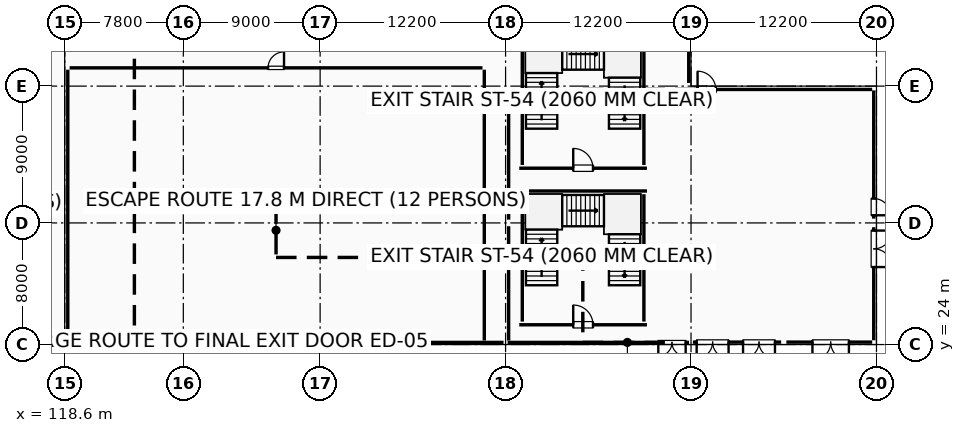
"""IFC4 building model, lengths in metres.
Left out: names, types, materials, properties, quantities, classifications, styles, units other than length and angle.
Written with IfcOpenShell. Run it as: python <this file> out.ifc"""

import sys

from ifc_helpers import new_model, si_unit, direction, frame, frame_2d, origin, origin_2d, place, context, subcontext, project, spatial, rectangle, i_section, extrude, element, fill, save


model = new_model("IFC4")
c1 = context("Model", 3, precision=1e-05, world=origin(), true_north=direction((0.0, 1.0)))
c2 = subcontext(c1, "Body", "Model", "MODEL_VIEW")
j1 = project(units=[si_unit("LENGTHUNIT", "METRE"), si_unit("PLANEANGLEUNIT", "RADIAN")], contexts=[c1])
p1 = place(None, origin())
s1 = spatial("IfcSite", under=j1, at=p1, CompositionType="ELEMENT")
p2 = place(p1, origin())
s2 = spatial("IfcBuilding", under=s1, at=p2, CompositionType="ELEMENT")
p3 = place(p2, origin())
s3 = spatial("IfcBuildingStorey", under=s2, at=p3, CompositionType="ELEMENT", Elevation=0.0)
for number, where, z_axis, x_axis in (
    (1, (126.4, 24.0, 0.0), (0.0, 0.0, 1.0), (1.0, 0.0, 0.0)),
    (2, (126.4, 32.0, 0.0), (0.0, 0.0, 1.0), (1.0, 0.0, 0.0)),
    (3, (126.4, 41.0, 0.0), (0.0, 0.0, 1.0), (1.0, 0.0, 0.0)),
    (4, (135.4, 24.0, 0.0), (0.0, 0.0, 1.0), (1.0, 0.0, 0.0)),
    (5, (135.4, 41.0, 0.0), (0.0, 0.0, 1.0), (1.0, 0.0, 0.0)),
):
    element("IfcColumn", number, at=place(p3, frame(where, z_axis=z_axis, x_axis=x_axis)), inside=s3, PredefinedType="COLUMN", context=c2, shape_type="SweptSolid", body=[
        extrude(rectangle(XDim=0.75, YDim=0.75, at=origin_2d()), origin(), (0.0, 0.0, 1.0), 5.4),
    ])
for number, where, z_axis, x_axis in (
    (6, (147.6, 24.0, 0.0), (0.0, 0.0, 1.0), (1.0, 0.0, 0.0)),
    (7, (147.6, 32.0, 0.0), (0.0, 0.0, 1.0), (1.0, 0.0, 0.0)),
    (8, (147.6, 41.0, 0.0), (0.0, 0.0, 1.0), (1.0, 0.0, 0.0)),
    (9, (159.8, 24.0, 0.0), (0.0, 0.0, 1.0), (1.0, 0.0, 0.0)),
    (10, (159.8, 32.0, 0.0), (0.0, 0.0, 1.0), (1.0, 0.0, 0.0)),
    (11, (159.8, 41.0, 0.0), (0.0, 0.0, 1.0), (1.0, 0.0, 0.0)),
):
    element("IfcColumn", number, at=place(p3, frame(where, z_axis=z_axis, x_axis=x_axis)), inside=s3, PredefinedType="COLUMN", context=c2, shape_type="SweptSolid", body=[
        extrude(i_section(OverallWidth=0.25, OverallDepth=0.4, WebThickness=0.01, FlangeThickness=0.013, FilletRadius=0.014, at=origin_2d()), origin(), (0.0, 0.0, 1.0), 5.4),
    ])
for number, where, z_axis, x_axis in (
    (12, (172.0, 24.0, 0.0), (0.0, 0.0, 1.0), (1.0, 0.0, 0.0)),
    (13, (172.0, 32.0, 0.0), (0.0, 0.0, 1.0), (1.0, 0.0, 0.0)),
    (14, (172.0, 41.0, 0.0), (0.0, 0.0, 1.0), (1.0, 0.0, 0.0)),
):
    element("IfcColumn", number, at=place(p3, frame(where, z_axis=z_axis, x_axis=x_axis)), inside=s3, PredefinedType="COLUMN", context=c2, shape_type="SweptSolid", body=[
        extrude(rectangle(XDim=0.55, YDim=0.55, at=origin_2d()), origin(), (0.0, 0.0, 1.0), 5.36),
    ])
for number, where, z_axis, x_axis in (
    (15, (151.22, 31.08, 0.0), (0.0, 0.0, 1.0), (1.0, 0.0, 0.0)),
    (16, (154.18, 31.08, 0.0), (0.0, 0.0, 1.0), (1.0, 0.0, 0.0)),
    (17, (151.22, 41.38, 0.0), (0.0, 0.0, 1.0), (1.0, 0.0, 0.0)),
    (18, (154.18, 41.38, 0.0), (0.0, 0.0, 1.0), (1.0, 0.0, 0.0)),
):
    element("IfcColumn", number, at=place(p3, frame(where, z_axis=z_axis, x_axis=x_axis)), inside=s3, PredefinedType="COLUMN", context=c2, shape_type="SweptSolid", body=[
        extrude(i_section(OverallWidth=0.25, OverallDepth=0.35, WebThickness=0.01, FlangeThickness=0.012, FilletRadius=0.012, at=origin_2d()), origin(), (0.0, 0.0, 1.0), 5.4),
    ])
p4 = place(p3, frame((165.9, 24.0, 0.0), z_axis=(0.0, 0.0, 1.0), x_axis=(1.0, 0.0, 0.0)))
e19 = element("IfcColumn", 19, at=p4, inside=s3, PredefinedType="PILASTER", context=c2, shape_type="SweptSolid", body=[
    extrude(rectangle(XDim=0.35, YDim=0.6, at=origin_2d()), origin(), (0.0, 0.0, 1.0), 5.4),
])
p5 = place(p3, frame((159.65, 49.792, 0.0), z_axis=(0.0, 0.0, 1.0), x_axis=(0.0, -1.0, 0.0)))
e20 = element("IfcWall", 20, at=p5, inside=s3, PredefinedType="ELEMENTEDWALL", context=c2, shape_type="SweptSolid", body=[
    extrude(rectangle(XDim=8.584, YDim=0.26, at=frame_2d((4.292, 0.0))), origin(), (0.0, 0.0, 1.0), 4.655),
])
p6 = place(p5, frame((0.22, 0.0, 0.0)))
e21 = element("IfcOpeningElement", 21, at=p6, cuts=e20, PredefinedType="OPENING", context=c2, shape_type="SweptSolid", body=[
    extrude(rectangle(XDim=1.8, YDim=2.25, at=frame_2d((0.9, 1.125))), frame((0.0, 0.14, 0.0), z_axis=(0.0, -1.0, 0.0), x_axis=(1.0, 0.0, 0.0)), (0.0, 0.0, 1.0), 0.28),
])
p7 = place(p3, frame((160.01, 40.78, 0.0), z_axis=(0.0, 0.0, 1.0), x_axis=(1.0, 0.0, 0.0)))
e22 = element("IfcWall", 22, at=p7, inside=s3, PredefinedType="STANDARD", context=c2, shape_type="SweptSolid", body=[
    extrude(rectangle(XDim=11.707, YDim=0.4, at=frame_2d((5.854, 0.0))), origin(), (0.0, 0.0, 1.0), 4.555),
])
p8 = place(p7, frame((0.22, 0.0, 0.0)))
e23 = element("IfcOpeningElement", 23, at=p8, cuts=e22, PredefinedType="OPENING", context=c2, shape_type="SweptSolid", body=[
    extrude(rectangle(XDim=1.2, YDim=2.2, at=frame_2d((0.6, 1.1))), frame((0.0, 0.21, 0.0), z_axis=(0.0, -1.0, 0.0), x_axis=(1.0, 0.0, 0.0)), (0.0, 0.0, 1.0), 0.42),
])
p9 = place(p3, frame((171.82, 40.717, 0.0), z_axis=(0.0, 0.0, 1.0), x_axis=(0.0, -1.0, 0.0)))
e24 = element("IfcWall", 24, at=p9, inside=s3, PredefinedType="STANDARD", context=c2, shape_type="SweptSolid", body=[
    extrude(rectangle(XDim=8.434, YDim=0.32, at=frame_2d((4.217, 0.0))), origin(), (0.0, 0.0, 1.0), 4.605),
])
p10 = place(p9, frame((7.114, 0.0, 0.0)))
e25 = element("IfcOpeningElement", 25, at=p10, cuts=e24, PredefinedType="OPENING", context=c2, shape_type="SweptSolid", body=[
    extrude(rectangle(XDim=1.1, YDim=2.2, at=frame_2d((0.55, 1.1))), frame((0.0, 0.17, 0.0), z_axis=(0.0, -1.0, 0.0), x_axis=(1.0, 0.0, 0.0)), (0.0, 0.0, 1.0), 0.34),
])
p11 = place(p3, frame((171.82, 31.717, 0.0), z_axis=(0.0, 0.0, 1.0), x_axis=(0.0, -1.0, 0.0)))
e26 = element("IfcWall", 26, at=p11, inside=s3, PredefinedType="STANDARD", context=c2, shape_type="SweptSolid", body=[
    extrude(rectangle(XDim=7.434, YDim=0.32, at=frame_2d((3.717, 0.0))), origin(), (0.0, 0.0, 1.0), 4.555),
])
p12 = place(p11, frame((0.22, 0.0, 0.0)))
e27 = element("IfcOpeningElement", 27, at=p12, cuts=e26, PredefinedType="OPENING", context=c2, shape_type="SweptSolid", body=[
    extrude(rectangle(XDim=2.4, YDim=2.4, at=frame_2d((1.2, 1.2))), frame((0.0, 0.17, 0.0), z_axis=(0.0, -1.0, 0.0), x_axis=(1.0, 0.0, 0.0)), (0.0, 0.0, 1.0), 0.34),
])
p13 = place(p3, frame((171.717, 24.16, 0.0), z_axis=(0.0, 0.0, 1.0), x_axis=(-1.0, 0.0, 0.0)))
e28 = element("IfcWall", 28, at=p13, inside=s3, PredefinedType="STANDARD", context=c2, shape_type="SweptSolid", body=[
    extrude(rectangle(XDim=5.645, YDim=0.28, at=frame_2d((2.823, 0.0))), origin(), (0.0, 0.0, 1.0), 4.655),
])
p14 = place(p13, frame((1.53, 0.0, 0.0)))
e29 = element("IfcOpeningElement", 29, at=p14, cuts=e28, PredefinedType="OPENING", context=c2, shape_type="SweptSolid", body=[
    extrude(rectangle(XDim=2.4, YDim=2.4, at=frame_2d((1.2, 1.2))), frame((0.0, 0.15, 0.0), z_axis=(0.0, -1.0, 0.0), x_axis=(1.0, 0.0, 0.0)), (0.0, 0.0, 1.0), 0.3),
])
p15 = place(p3, frame((165.728, 24.16, 0.0), z_axis=(0.0, 0.0, 1.0), x_axis=(-1.0, 0.0, 0.0)))
e30 = element("IfcWall", 30, at=p15, inside=s3, PredefinedType="STANDARD", context=c2, shape_type="SweptSolid", body=[
    extrude(rectangle(XDim=5.804, YDim=0.28, at=frame_2d((2.902, 0.0))), origin(), (0.0, 0.0, 1.0), 4.655),
])
p16 = place(p15, frame((0.406, 0.0, 0.0)))
e31 = element("IfcOpeningElement", 31, at=p16, cuts=e30, PredefinedType="OPENING", context=c2, shape_type="SweptSolid", body=[
    extrude(rectangle(XDim=2.1, YDim=2.4, at=frame_2d((1.05, 1.2))), frame((0.0, 0.15, 0.0), z_axis=(0.0, -1.0, 0.0), x_axis=(1.0, 0.0, 0.0)), (0.0, 0.0, 1.0), 0.3),
])
p17 = place(p15, frame((3.458, 0.0, 0.0)))
e32 = element("IfcOpeningElement", 32, at=p17, cuts=e30, PredefinedType="OPENING", context=c2, shape_type="SweptSolid", body=[
    extrude(rectangle(XDim=2.1, YDim=2.4, at=frame_2d((1.05, 1.2))), frame((0.0, 0.15, 0.0), z_axis=(0.0, -1.0, 0.0), x_axis=(1.0, 0.0, 0.0)), (0.0, 0.0, 1.0), 0.3),
])
p18 = place(p3, frame((159.667, 24.14, 0.0), z_axis=(0.0, 0.0, 1.0), x_axis=(-1.0, 0.0, 0.0)))
e33 = element("IfcWall", 33, at=p18, inside=s3, PredefinedType="ELEMENTEDWALL", context=c2, shape_type="SweptSolid", body=[
    extrude(rectangle(XDim=11.934, YDim=0.24, at=frame_2d((5.967, 0.0))), origin(), (0.0, 0.0, 1.0), 4.455),
])
p19 = place(p18, frame((0.22, 0.0, 0.0)))
e34 = element("IfcOpeningElement", 34, at=p19, cuts=e33, PredefinedType="OPENING", context=c2, shape_type="SweptSolid", body=[
    extrude(rectangle(XDim=1.8, YDim=2.25, at=frame_2d((0.9, 1.125))), frame((0.0, 0.13, 0.0), z_axis=(0.0, -1.0, 0.0), x_axis=(1.0, 0.0, 0.0)), (0.0, 0.0, 1.0), 0.26),
])
p20 = place(p3, frame((147.467, 24.14, 0.0), z_axis=(0.0, 0.0, 1.0), x_axis=(-1.0, 0.0, 0.0)))
e35 = element("IfcWall", 35, at=p20, inside=s3, PredefinedType="ELEMENTEDWALL", context=c2, shape_type="SweptSolid", body=[
    extrude(rectangle(XDim=11.684, YDim=0.24, at=frame_2d((5.842, 0.0))), origin(), (0.0, 0.0, 1.0), 4.355),
])
p21 = place(p20, frame((10.264, 0.0, 0.0)))
e36 = element("IfcOpeningElement", 36, at=p21, cuts=e35, PredefinedType="OPENING", context=c2, shape_type="SweptSolid", body=[
    extrude(rectangle(XDim=1.2, YDim=2.2, at=frame_2d((0.6, 1.1))), frame((0.0, 0.13, 0.0), z_axis=(0.0, -1.0, 0.0), x_axis=(1.0, 0.0, 0.0)), (0.0, 0.0, 1.0), 0.26),
])
p22 = place(p3, frame((135.017, 24.14, 0.0), z_axis=(0.0, 0.0, 1.0), x_axis=(-1.0, 0.0, 0.0)))
e37 = element("IfcWall", 37, at=p22, inside=s3, PredefinedType="ELEMENTEDWALL", context=c2, shape_type="SweptSolid", body=[
    extrude(rectangle(XDim=8.234, YDim=0.24, at=frame_2d((4.117, 0.0))), origin(), (0.0, 0.0, 1.0), 4.255),
])
p23 = place(p22, frame((0.22, 0.0, 0.0)))
e38 = element("IfcOpeningElement", 38, at=p23, cuts=e37, PredefinedType="OPENING", context=c2, shape_type="SweptSolid", body=[
    extrude(rectangle(XDim=1.1, YDim=2.2, at=frame_2d((0.55, 1.1))), frame((0.0, 0.13, 0.0), z_axis=(0.0, -1.0, 0.0), x_axis=(1.0, 0.0, 0.0)), (0.0, 0.0, 1.0), 0.26),
])
p24 = place(p22, frame((6.914, 0.0, 0.0)))
e39 = element("IfcOpeningElement", 39, at=p24, cuts=e37, PredefinedType="OPENING", context=c2, shape_type="SweptSolid", body=[
    extrude(rectangle(XDim=1.1, YDim=2.2, at=frame_2d((0.55, 1.1))), frame((0.0, 0.13, 0.0), z_axis=(0.0, -1.0, 0.0), x_axis=(1.0, 0.0, 0.0)), (0.0, 0.0, 1.0), 0.26),
])
p25 = place(p3, frame((126.017, 24.14, 0.0), z_axis=(0.0, 0.0, 1.0), x_axis=(-1.0, 0.0, 0.0)))
e40 = element("IfcWall", 40, at=p25, inside=s3, PredefinedType="ELEMENTEDWALL", context=c2, shape_type="SweptSolid", body=[
    extrude(rectangle(XDim=7.287, YDim=0.24, at=frame_2d((3.644, 0.0))), origin(), (0.0, 0.0, 1.0), 5.12),
])
p26 = place(p25, frame((2.943, 0.0, 0.95)))
e41 = element("IfcOpeningElement", 41, at=p26, cuts=e40, PredefinedType="OPENING", context=c2, shape_type="SweptSolid", body=[
    extrude(rectangle(XDim=1.4, YDim=1.5, at=frame_2d((0.7, 0.75))), frame((0.0, 0.13, 0.0), z_axis=(0.0, -1.0, 0.0), x_axis=(1.0, 0.0, 0.0)), (0.0, 0.0, 1.0), 0.26),
])
p27 = place(p3, frame((118.36, 23.88, 0.0), z_axis=(0.0, 0.0, 1.0), x_axis=(0.0, -1.0, 0.0)))
e42 = element("IfcWall", 42, at=p27, inside=s3, PredefinedType="PARAPET", context=c2, shape_type="SweptSolid", body=[
    extrude(rectangle(XDim=15.76, YDim=0.18, at=frame_2d((7.88, 0.0))), origin(), (0.0, 0.0, 1.0), 0.88),
])
p28 = place(p3, frame((148.5, 25.3, 0.0), z_axis=(0.0, 0.0, 1.0), x_axis=(1.0, 0.0, 0.0)))
e43 = element("IfcWall", 43, at=p28, inside=s3, PredefinedType="SHEAR", context=c2, shape_type="SweptSolid", body=[
    extrude(rectangle(XDim=8.4, YDim=0.4, at=frame_2d((4.2, 0.0))), origin(), (0.0, 0.0, 1.0), 5.12),
])
p29 = place(p28, frame((3.55, 0.0, 0.0)))
e44 = element("IfcOpeningElement", 44, at=p29, cuts=e43, PredefinedType="OPENING", context=c2, shape_type="SweptSolid", body=[
    extrude(rectangle(XDim=1.3, YDim=2.15, at=frame_2d((0.65, 1.075))), frame((0.0, 0.21, 0.0), z_axis=(0.0, -1.0, 0.0), x_axis=(1.0, 0.0, 0.0)), (0.0, 0.0, 1.0), 0.42),
])
p30 = place(p3, frame((156.9, 34.1, 0.0), z_axis=(0.0, 0.0, 1.0), x_axis=(-1.0, 0.0, 0.0)))
e45 = element("IfcWall", 45, at=p30, inside=s3, PredefinedType="SHEAR", context=c2, shape_type="SweptSolid", body=[
    extrude(rectangle(XDim=8.4, YDim=0.4, at=frame_2d((4.2, 0.0))), origin(), (0.0, 0.0, 1.0), 5.12),
])
for number, where, z_axis, x_axis in (
    (46, (156.7, 25.51, 0.0), (0.0, 0.0, 1.0), (0.0, 1.0, 0.0)),
    (47, (148.7, 33.89, 0.0), (0.0, 0.0, 1.0), (0.0, -1.0, 0.0)),
):
    element("IfcWall", number, at=place(p3, frame(where, z_axis=z_axis, x_axis=x_axis)), inside=s3, PredefinedType="SHEAR", context=c2, shape_type="SweptSolid", body=[
        extrude(rectangle(XDim=8.38, YDim=0.4, at=frame_2d((4.19, 0.0))), origin(), (0.0, 0.0, 1.0), 5.12),
    ])
p31 = place(p3, frame((148.5, 35.6, 0.0), z_axis=(0.0, 0.0, 1.0), x_axis=(1.0, 0.0, 0.0)))
e48 = element("IfcWall", 48, at=p31, inside=s3, PredefinedType="SHEAR", context=c2, shape_type="SweptSolid", body=[
    extrude(rectangle(XDim=8.4, YDim=0.4, at=frame_2d((4.2, 0.0))), origin(), (0.0, 0.0, 1.0), 5.12),
])
p32 = place(p31, frame((3.55, 0.0, 0.0)))
e49 = element("IfcOpeningElement", 49, at=p32, cuts=e48, PredefinedType="OPENING", context=c2, shape_type="SweptSolid", body=[
    extrude(rectangle(XDim=1.3, YDim=2.15, at=frame_2d((0.65, 1.075))), frame((0.0, 0.21, 0.0), z_axis=(0.0, -1.0, 0.0), x_axis=(1.0, 0.0, 0.0)), (0.0, 0.0, 1.0), 0.42),
])
for number, where, z_axis, x_axis in (
    (50, (156.7, 35.81, 0.0), (0.0, 0.0, 1.0), (0.0, 1.0, 0.0)),
    (51, (148.7, 44.19, 0.0), (0.0, 0.0, 1.0), (0.0, -1.0, 0.0)),
):
    element("IfcWall", number, at=place(p3, frame(where, z_axis=z_axis, x_axis=x_axis)), inside=s3, PredefinedType="SHEAR", context=c2, shape_type="SweptSolid", body=[
        extrude(rectangle(XDim=8.38, YDim=0.4, at=frame_2d((4.19, 0.0))), origin(), (0.0, 0.0, 1.0), 5.12),
    ])
p33 = place(p3, frame((118.92, 42.2, 0.0), z_axis=(0.0, 0.0, 1.0), x_axis=(1.0, 0.0, 0.0)))
e52 = element("IfcWall", 52, at=p33, inside=s3, PredefinedType="PARTITIONING", context=c2, shape_type="SweptSolid", body=[
    extrude(rectangle(XDim=27.16, YDim=0.2, at=frame_2d((13.58, 0.0))), origin(), (0.0, 0.0, 1.0), 5.11),
])
p34 = place(p33, frame((13.055, 0.0, 0.0)))
e53 = element("IfcOpeningElement", 53, at=p34, cuts=e52, PredefinedType="OPENING", context=c2, shape_type="SweptSolid", body=[
    extrude(rectangle(XDim=1.05, YDim=2.15, at=frame_2d((0.525, 1.075))), frame((0.0, 0.11, 0.0), z_axis=(0.0, -1.0, 0.0), x_axis=(1.0, 0.0, 0.0)), (0.0, 0.0, 1.0), 0.22),
])
p35 = place(p3, frame((146.2, 42.08, 0.0), z_axis=(0.0, 0.0, 1.0), x_axis=(0.0, -1.0, 0.0)))
e54 = element("IfcWall", 54, at=p35, inside=s3, PredefinedType="PARTITIONING", context=c2, shape_type="SweptSolid", body=[
    extrude(rectangle(XDim=17.816, YDim=0.2, at=frame_2d((8.908, 0.0))), origin(), (0.0, 0.0, 1.0), 5.11),
])
p36 = place(p3, frame((118.8, 24.264, 0.0), z_axis=(0.0, 0.0, 1.0), x_axis=(0.0, 1.0, 0.0)))
e55 = element("IfcWall", 55, at=p36, inside=s3, PredefinedType="PARTITIONING", context=c2, shape_type="SweptSolid", body=[
    extrude(rectangle(XDim=17.816, YDim=0.2, at=frame_2d((8.908, 0.0))), origin(), (0.0, 0.0, 1.0), 4.3),
])
p37 = place(p3, frame((147.8, 24.264, 0.0), z_axis=(0.0, 0.0, 1.0), x_axis=(0.0, 1.0, 0.0)))
e56 = element("IfcWall", 56, at=p37, inside=s3, PredefinedType="PARTITIONING", context=c2, shape_type="SweptSolid", body=[
    extrude(rectangle(XDim=7.521, YDim=0.2, at=frame_2d((3.76, 0.0))), origin(), (0.0, 0.0, 1.0), 4.65),
])
p38 = place(p3, frame((147.8, 32.215, 0.0), z_axis=(0.0, 0.0, 1.0), x_axis=(0.0, 1.0, 0.0)))
e57 = element("IfcWall", 57, at=p38, inside=s3, PredefinedType="PARTITIONING", context=c2, shape_type="SweptSolid", body=[
    extrude(rectangle(XDim=8.265, YDim=0.2, at=frame_2d((4.132, 0.0))), origin(), (0.0, 0.0, 1.0), 4.1),
])
p39 = place(p8, origin())
e58 = element("IfcDoor", 58, at=p39, inside=s3, OperationType="SINGLE_SWING_LEFT", PredefinedType="DOOR", context=c2, shape_type="SweptSolid", body=[
    extrude(rectangle(XDim=1.2, YDim=2.2, at=frame_2d((0.6, 1.1))), frame((0.0, 0.025, 0.0), z_axis=(0.0, -1.0, 0.0), x_axis=(1.0, 0.0, 0.0)), (0.0, 0.0, 1.0), 0.05),
])
fill(e23, e58)
p40 = place(p10, origin())
e59 = element("IfcDoor", 59, at=p40, inside=s3, OperationType="SINGLE_SWING_RIGHT", PredefinedType="DOOR", context=c2, shape_type="SweptSolid", body=[
    extrude(rectangle(XDim=1.1, YDim=2.2, at=frame_2d((0.55, 1.1))), frame((0.0, 0.025, 0.0), z_axis=(0.0, -1.0, 0.0), x_axis=(1.0, 0.0, 0.0)), (0.0, 0.0, 1.0), 0.05),
])
fill(e25, e59)
p41 = place(p12, origin())
e60 = element("IfcDoor", 60, at=p41, inside=s3, OperationType="DOUBLE_SWING_LEFT", PredefinedType="DOOR", context=c2, shape_type="SweptSolid", body=[
    extrude(rectangle(XDim=2.4, YDim=2.4, at=frame_2d((1.2, 1.2))), frame((0.0, 0.025, 0.0), z_axis=(0.0, -1.0, 0.0), x_axis=(1.0, 0.0, 0.0)), (0.0, 0.0, 1.0), 0.05),
])
fill(e27, e60)
p42 = place(p14, origin())
e61 = element("IfcDoor", 61, at=p42, inside=s3, OperationType="DOUBLE_SWING_LEFT", PredefinedType="DOOR", context=c2, shape_type="SweptSolid", body=[
    extrude(rectangle(XDim=2.4, YDim=2.4, at=frame_2d((1.2, 1.2))), frame((0.0, 0.025, 0.0), z_axis=(0.0, -1.0, 0.0), x_axis=(1.0, 0.0, 0.0)), (0.0, 0.0, 1.0), 0.05),
])
fill(e29, e61)
p43 = place(p16, origin())
e62 = element("IfcDoor", 62, at=p43, inside=s3, OperationType="DOUBLE_SWING_RIGHT", PredefinedType="DOOR", context=c2, shape_type="SweptSolid", body=[
    extrude(rectangle(XDim=2.1, YDim=2.4, at=frame_2d((1.05, 1.2))), frame((0.0, 0.025, 0.0), z_axis=(0.0, -1.0, 0.0), x_axis=(1.0, 0.0, 0.0)), (0.0, 0.0, 1.0), 0.05),
])
fill(e31, e62)
p44 = place(p17, origin())
e63 = element("IfcDoor", 63, at=p44, inside=s3, OperationType="DOUBLE_SWING_RIGHT", PredefinedType="DOOR", context=c2, shape_type="SweptSolid", body=[
    extrude(rectangle(XDim=2.1, YDim=2.4, at=frame_2d((1.05, 1.2))), frame((0.0, 0.025, 0.0), z_axis=(0.0, -1.0, 0.0), x_axis=(1.0, 0.0, 0.0)), (0.0, 0.0, 1.0), 0.05),
])
fill(e32, e63)
p45 = place(p19, origin())
e64 = element("IfcDoor", 64, at=p45, inside=s3, OperationType="DOUBLE_DOOR_SINGLE_SWING", PredefinedType="DOOR", context=c2, shape_type="SweptSolid", body=[
    extrude(rectangle(XDim=1.8, YDim=2.25, at=frame_2d((0.9, 1.125))), frame((0.0, 0.025, 0.0), z_axis=(0.0, -1.0, 0.0), x_axis=(1.0, 0.0, 0.0)), (0.0, 0.0, 1.0), 0.05),
])
fill(e34, e64)
p46 = place(p21, origin())
e65 = element("IfcDoor", 65, at=p46, inside=s3, OperationType="SINGLE_SWING_LEFT", PredefinedType="DOOR", context=c2, shape_type="SweptSolid", body=[
    extrude(rectangle(XDim=1.2, YDim=2.2, at=frame_2d((0.6, 1.1))), frame((0.0, 0.025, 0.0), z_axis=(0.0, -1.0, 0.0), x_axis=(1.0, 0.0, 0.0)), (0.0, 0.0, 1.0), 0.05),
])
fill(e36, e65)
p47 = place(p23, origin())
e66 = element("IfcDoor", 66, at=p47, inside=s3, OperationType="SINGLE_SWING_RIGHT", PredefinedType="DOOR", context=c2, shape_type="SweptSolid", body=[
    extrude(rectangle(XDim=1.1, YDim=2.2, at=frame_2d((0.55, 1.1))), frame((0.0, 0.025, 0.0), z_axis=(0.0, -1.0, 0.0), x_axis=(1.0, 0.0, 0.0)), (0.0, 0.0, 1.0), 0.05),
])
fill(e38, e66)
p48 = place(p24, origin())
e67 = element("IfcDoor", 67, at=p48, inside=s3, OperationType="SINGLE_SWING_RIGHT", PredefinedType="DOOR", context=c2, shape_type="SweptSolid", body=[
    extrude(rectangle(XDim=1.1, YDim=2.2, at=frame_2d((0.55, 1.1))), frame((0.0, 0.025, 0.0), z_axis=(0.0, -1.0, 0.0), x_axis=(1.0, 0.0, 0.0)), (0.0, 0.0, 1.0), 0.05),
])
fill(e39, e67)
p49 = place(p26, origin())
e68 = element("IfcWindow", 68, at=p49, inside=s3, PartitioningType="SINGLE_PANEL", PredefinedType="WINDOW", context=c2, shape_type="SweptSolid", body=[
    extrude(rectangle(XDim=1.4, YDim=1.5, at=frame_2d((0.7, 0.75))), frame((0.0, 0.03, 0.0), z_axis=(0.0, -1.0, 0.0), x_axis=(1.0, 0.0, 0.0)), (0.0, 0.0, 1.0), 0.06),
])
fill(e41, e68)
p50 = place(p29, origin())
e69 = element("IfcDoor", 69, at=p50, inside=s3, OperationType="SINGLE_SWING_LEFT", PredefinedType="DOOR", context=c2, shape_type="SweptSolid", body=[
    extrude(rectangle(XDim=1.3, YDim=2.15, at=frame_2d((0.65, 1.075))), frame((0.0, 0.025, 0.0), z_axis=(0.0, -1.0, 0.0), x_axis=(1.0, 0.0, 0.0)), (0.0, 0.0, 1.0), 0.05),
])
fill(e44, e69)
p51 = place(p32, origin())
e70 = element("IfcDoor", 70, at=p51, inside=s3, OperationType="SINGLE_SWING_LEFT", PredefinedType="DOOR", context=c2, shape_type="SweptSolid", body=[
    extrude(rectangle(XDim=1.3, YDim=2.15, at=frame_2d((0.65, 1.075))), frame((0.0, 0.025, 0.0), z_axis=(0.0, -1.0, 0.0), x_axis=(1.0, 0.0, 0.0)), (0.0, 0.0, 1.0), 0.05),
])
fill(e49, e70)
p52 = place(p34, origin())
e71 = element("IfcDoor", 71, at=p52, inside=s3, OperationType="SINGLE_SWING_RIGHT", PredefinedType="DOOR", context=c2, shape_type="SweptSolid", body=[
    extrude(rectangle(XDim=1.05, YDim=2.15, at=frame_2d((0.525, 1.075))), frame((0.0, 0.025, 0.0), z_axis=(0.0, -1.0, 0.0), x_axis=(1.0, 0.0, 0.0)), (0.0, 0.0, 1.0), 0.05),
])
fill(e53, e71)
save(model, sys.argv[1])
